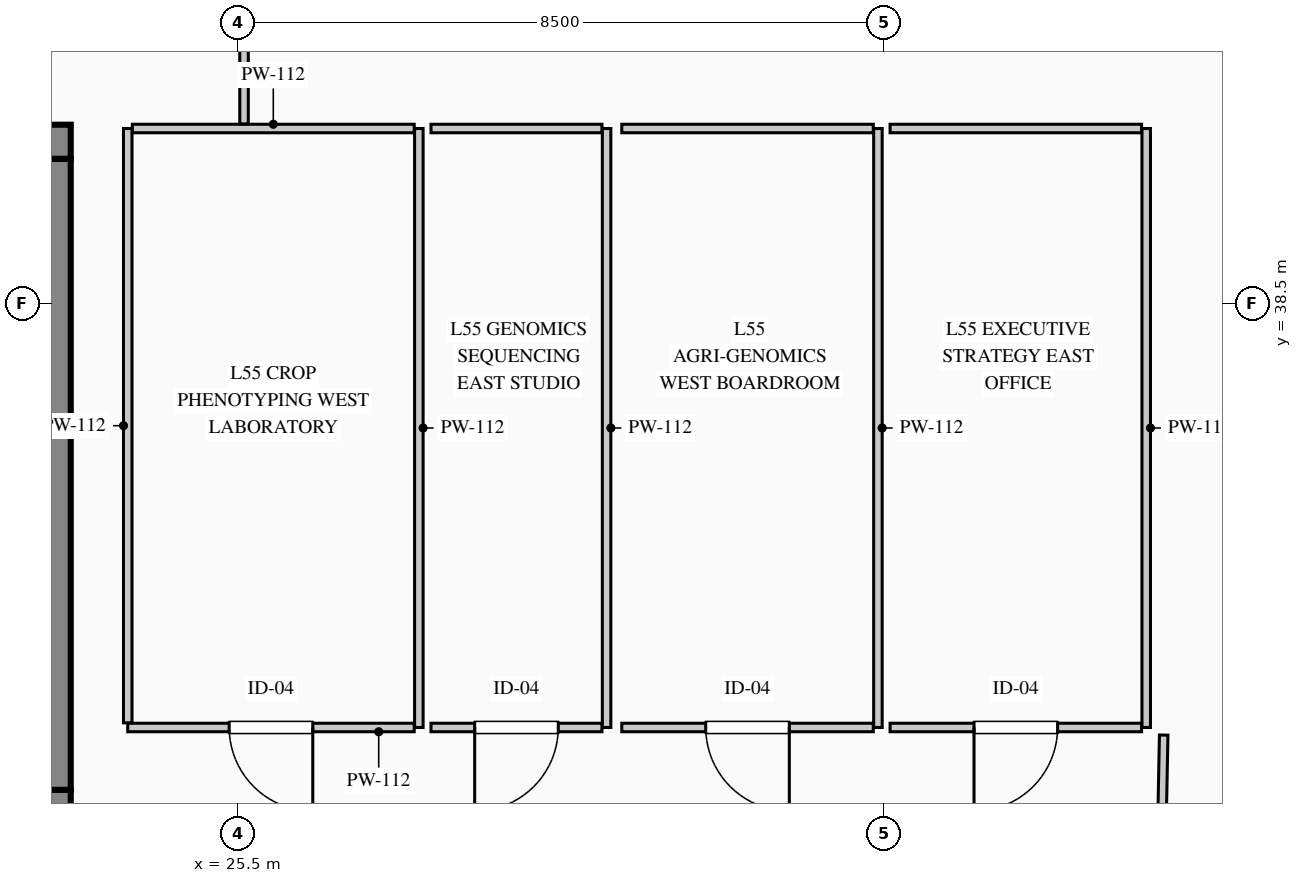
"""IFC4 building model, lengths in metres.
Left out: names, types, materials, properties, quantities, classifications, styles, units other than length and angle.
Written with IfcOpenShell. Run it as: python <this file> out.ifc"""

import sys

from ifc_helpers import new_model, si_unit, direction, frame, frame_2d, origin, place, context, subcontext, project, spatial, rectangle, extrude, element, fill, save


model = new_model("IFC4")
c1 = context("Model", 3, precision=1e-05, world=origin(), true_north=direction((0.0, 1.0)))
c2 = subcontext(c1, "Body", "Model", "MODEL_VIEW")
j1 = project(units=[si_unit("LENGTHUNIT", "METRE"), si_unit("PLANEANGLEUNIT", "RADIAN")], contexts=[c1])
p1 = place(None, origin())
s1 = spatial("IfcSite", under=j1, at=p1, CompositionType="ELEMENT")
p2 = place(p1, origin())
s2 = spatial("IfcBuilding", under=s1, at=p2, CompositionType="ELEMENT")
p3 = place(p2, frame((0.0, 0.0, 231.15)))
s3 = spatial("IfcBuildingStorey", under=s2, at=p3, CompositionType="ELEMENT", Elevation=231.15)
p4 = place(p3, frame((5.55, 40.625, 0.0), z_axis=(0.0, 0.0, 1.0), x_axis=(1.0, 0.0, 0.0)))
e1 = element("IfcWall", 1, at=p4, inside=s3, PredefinedType="SHEAR", context=c2, shape_type="SweptSolid", body=[
    extrude(rectangle(XDim=17.75, YDim=0.45, at=frame_2d((8.875, 0.0))), origin(), (0.0, 0.0, 1.0), 3.95),
])
p5 = place(p4, frame((15.895, 0.0, 0.0)))
e2 = element("IfcOpeningElement", 2, at=p5, cuts=e1, PredefinedType="OPENING", context=c2, shape_type="SweptSolid", body=[
    extrude(rectangle(XDim=1.18, YDim=2.25, at=frame_2d((0.59, 1.125))), frame((0.0, 0.235, 0.0), z_axis=(0.0, -1.0, 0.0), x_axis=(1.0, 0.0, 0.0)), (0.0, 0.0, 1.0), 0.47),
])
p6 = place(p3, frame((5.55, 31.875, 0.0), z_axis=(0.0, 0.0, 1.0), x_axis=(1.0, 0.0, 0.0)))
e3 = element("IfcWall", 3, at=p6, inside=s3, PredefinedType="SHEAR", context=c2, shape_type="SweptSolid", body=[
    extrude(rectangle(XDim=17.75, YDim=0.45, at=frame_2d((8.875, 0.0))), origin(), (0.0, 0.0, 1.0), 3.95),
])
p7 = place(p6, frame((3.1, 0.0, 0.0)))
e4 = element("IfcOpeningElement", 4, at=p7, cuts=e3, PredefinedType="OPENING", context=c2, shape_type="SweptSolid", body=[
    extrude(rectangle(XDim=1.2, YDim=2.2, at=frame_2d((0.6, 1.1))), frame((0.0, 0.235, 0.0), z_axis=(0.0, -1.0, 0.0), x_axis=(1.0, 0.0, 0.0)), (0.0, 0.0, 1.0), 0.47),
])
p8 = place(p6, frame((6.95, 0.0, 0.0)))
e5 = element("IfcOpeningElement", 5, at=p8, cuts=e3, PredefinedType="OPENING", context=c2, shape_type="SweptSolid", body=[
    extrude(rectangle(XDim=1.2, YDim=2.2, at=frame_2d((0.6, 1.1))), frame((0.0, 0.235, 0.0), z_axis=(0.0, -1.0, 0.0), x_axis=(1.0, 0.0, 0.0)), (0.0, 0.0, 1.0), 0.47),
])
p9 = place(p6, frame((8.8, 0.0, 0.0)))
e6 = element("IfcOpeningElement", 6, at=p9, cuts=e3, PredefinedType="OPENING", context=c2, shape_type="SweptSolid", body=[
    extrude(rectangle(XDim=1.15, YDim=2.2, at=frame_2d((0.575, 1.1))), frame((0.0, 0.235, 0.0), z_axis=(0.0, -1.0, 0.0), x_axis=(1.0, 0.0, 0.0)), (0.0, 0.0, 1.0), 0.47),
])
p10 = place(p6, frame((15.9, 0.0, 0.0)))
e7 = element("IfcOpeningElement", 7, at=p10, cuts=e3, PredefinedType="OPENING", context=c2, shape_type="SweptSolid", body=[
    extrude(rectangle(XDim=1.2, YDim=2.2, at=frame_2d((0.6, 1.1))), frame((0.0, 0.235, 0.0), z_axis=(0.0, -1.0, 0.0), x_axis=(1.0, 0.0, 0.0)), (0.0, 0.0, 1.0), 0.47),
])
p11 = place(p3, frame((23.075, 32.1, 0.0), z_axis=(0.0, 0.0, 1.0), x_axis=(0.0, 1.0, 0.0)))
e8 = element("IfcWall", 8, at=p11, inside=s3, PredefinedType="SHEAR", context=c2, shape_type="SweptSolid", body=[
    extrude(rectangle(XDim=8.3, YDim=0.45, at=frame_2d((4.15, 0.0))), origin(), (0.0, 0.0, 1.0), 3.95),
])
p12 = place(p3, frame((27.88, 40.8, 0.0), z_axis=(0.0, 0.0, 1.0), x_axis=(0.0, -1.0, 0.0)))
e9 = element("IfcWall", 9, at=p12, inside=s3, PredefinedType="PARTITIONING", context=c2, shape_type="SweptSolid", body=[
    extrude(rectangle(XDim=7.88, YDim=0.112, at=frame_2d((3.94, 0.0))), origin(), (0.0, 0.0, 1.0), 3.7),
])
p13 = place(p3, frame((27.819, 32.92, 0.0), z_axis=(0.0, 0.0, 1.0), x_axis=(-1.0, 0.0, 0.0)))
e10 = element("IfcWall", 10, at=p13, inside=s3, PredefinedType="PARTITIONING", context=c2, shape_type="SweptSolid", body=[
    extrude(rectangle(XDim=3.769, YDim=0.112, at=frame_2d((1.885, 0.0))), origin(), (0.0, 0.0, 1.0), 3.7),
])
p14 = place(p13, frame((1.334, 0.0, 0.0)))
e11 = element("IfcOpeningElement", 11, at=p14, cuts=e10, PredefinedType="OPENING", context=c2, shape_type="SweptSolid", body=[
    extrude(rectangle(XDim=1.1, YDim=2.2, at=frame_2d((0.55, 1.1))), frame((0.0, 0.066, 0.0), z_axis=(0.0, -1.0, 0.0), x_axis=(1.0, 0.0, 0.0)), (0.0, 0.0, 1.0), 0.132),
])
p15 = place(p3, frame((24.05, 32.981, 0.0), z_axis=(0.0, 0.0, 1.0), x_axis=(0.0, 1.0, 0.0)))
e12 = element("IfcWall", 12, at=p15, inside=s3, PredefinedType="PARTITIONING", context=c2, shape_type="SweptSolid", body=[
    extrude(rectangle(XDim=7.819, YDim=0.112, at=frame_2d((3.91, 0.0))), origin(), (0.0, 0.0, 1.0), 3.7),
])
p16 = place(p3, frame((24.111, 40.8, 0.0), z_axis=(0.0, 0.0, 1.0), x_axis=(1.0, 0.0, 0.0)))
e13 = element("IfcWall", 13, at=p16, inside=s3, PredefinedType="PARTITIONING", context=c2, shape_type="SweptSolid", body=[
    extrude(rectangle(XDim=3.708, YDim=0.112, at=frame_2d((1.854, 0.0))), origin(), (0.0, 0.0, 1.0), 3.7),
])
p17 = place(p3, frame((30.35, 40.8, 0.0), z_axis=(0.0, 0.0, 1.0), x_axis=(0.0, -1.0, 0.0)))
e14 = element("IfcWall", 14, at=p17, inside=s3, PredefinedType="PARTITIONING", context=c2, shape_type="SweptSolid", body=[
    extrude(rectangle(XDim=7.88, YDim=0.112, at=frame_2d((3.94, 0.0))), origin(), (0.0, 0.0, 1.0), 3.7),
])
p18 = place(p3, frame((30.289, 32.92, 0.0), z_axis=(0.0, 0.0, 1.0), x_axis=(-1.0, 0.0, 0.0)))
e15 = element("IfcWall", 15, at=p18, inside=s3, PredefinedType="PARTITIONING", context=c2, shape_type="SweptSolid", body=[
    extrude(rectangle(XDim=2.249, YDim=0.112, at=frame_2d((1.125, 0.0))), origin(), (0.0, 0.0, 1.0), 3.7),
])
p19 = place(p18, frame((0.574, 0.0, 0.0)))
e16 = element("IfcOpeningElement", 16, at=p19, cuts=e15, PredefinedType="OPENING", context=c2, shape_type="SweptSolid", body=[
    extrude(rectangle(XDim=1.1, YDim=2.2, at=frame_2d((0.55, 1.1))), frame((0.0, 0.066, 0.0), z_axis=(0.0, -1.0, 0.0), x_axis=(1.0, 0.0, 0.0)), (0.0, 0.0, 1.0), 0.132),
])
p20 = place(p3, frame((28.04, 40.8, 0.0), z_axis=(0.0, 0.0, 1.0), x_axis=(1.0, 0.0, 0.0)))
e17 = element("IfcWall", 17, at=p20, inside=s3, PredefinedType="PARTITIONING", context=c2, shape_type="SweptSolid", body=[
    extrude(rectangle(XDim=2.249, YDim=0.112, at=frame_2d((1.125, 0.0))), origin(), (0.0, 0.0, 1.0), 3.7),
])
p21 = place(p3, frame((33.92, 40.8, 0.0), z_axis=(0.0, 0.0, 1.0), x_axis=(0.0, -1.0, 0.0)))
e18 = element("IfcWall", 18, at=p21, inside=s3, PredefinedType="PARTITIONING", context=c2, shape_type="SweptSolid", body=[
    extrude(rectangle(XDim=7.88, YDim=0.112, at=frame_2d((3.94, 0.0))), origin(), (0.0, 0.0, 1.0), 3.7),
])
p22 = place(p3, frame((33.859, 32.92, 0.0), z_axis=(0.0, 0.0, 1.0), x_axis=(-1.0, 0.0, 0.0)))
e19 = element("IfcWall", 19, at=p22, inside=s3, PredefinedType="PARTITIONING", context=c2, shape_type="SweptSolid", body=[
    extrude(rectangle(XDim=3.309, YDim=0.112, at=frame_2d((1.654, 0.0))), origin(), (0.0, 0.0, 1.0), 3.7),
])
p23 = place(p22, frame((1.104, 0.0, 0.0)))
e20 = element("IfcOpeningElement", 20, at=p23, cuts=e19, PredefinedType="OPENING", context=c2, shape_type="SweptSolid", body=[
    extrude(rectangle(XDim=1.1, YDim=2.2, at=frame_2d((0.55, 1.1))), frame((0.0, 0.066, 0.0), z_axis=(0.0, -1.0, 0.0), x_axis=(1.0, 0.0, 0.0)), (0.0, 0.0, 1.0), 0.132),
])
p24 = place(p3, frame((30.55, 40.8, 0.0), z_axis=(0.0, 0.0, 1.0), x_axis=(1.0, 0.0, 0.0)))
e21 = element("IfcWall", 21, at=p24, inside=s3, PredefinedType="PARTITIONING", context=c2, shape_type="SweptSolid", body=[
    extrude(rectangle(XDim=3.309, YDim=0.112, at=frame_2d((1.654, 0.0))), origin(), (0.0, 0.0, 1.0), 3.7),
])
p25 = place(p3, frame((37.45, 40.8, 0.0), z_axis=(0.0, 0.0, 1.0), x_axis=(0.0, -1.0, 0.0)))
e22 = element("IfcWall", 22, at=p25, inside=s3, PredefinedType="PARTITIONING", context=c2, shape_type="SweptSolid", body=[
    extrude(rectangle(XDim=7.88, YDim=0.112, at=frame_2d((3.94, 0.0))), origin(), (0.0, 0.0, 1.0), 3.7),
])
p26 = place(p3, frame((37.389, 32.92, 0.0), z_axis=(0.0, 0.0, 1.0), x_axis=(-1.0, 0.0, 0.0)))
e23 = element("IfcWall", 23, at=p26, inside=s3, PredefinedType="PARTITIONING", context=c2, shape_type="SweptSolid", body=[
    extrude(rectangle(XDim=3.309, YDim=0.112, at=frame_2d((1.654, 0.0))), origin(), (0.0, 0.0, 1.0), 3.7),
])
p27 = place(p26, frame((1.104, 0.0, 0.0)))
e24 = element("IfcOpeningElement", 24, at=p27, cuts=e23, PredefinedType="OPENING", context=c2, shape_type="SweptSolid", body=[
    extrude(rectangle(XDim=1.1, YDim=2.2, at=frame_2d((0.55, 1.1))), frame((0.0, 0.066, 0.0), z_axis=(0.0, -1.0, 0.0), x_axis=(1.0, 0.0, 0.0)), (0.0, 0.0, 1.0), 0.132),
])
p28 = place(p3, frame((34.08, 40.8, 0.0), z_axis=(0.0, 0.0, 1.0), x_axis=(1.0, 0.0, 0.0)))
e25 = element("IfcWall", 25, at=p28, inside=s3, PredefinedType="PARTITIONING", context=c2, shape_type="SweptSolid", body=[
    extrude(rectangle(XDim=3.309, YDim=0.112, at=frame_2d((1.654, 0.0))), origin(), (0.0, 0.0, 1.0), 3.7),
])
p29 = place(p3, frame((37.599, 28.691, 0.0), z_axis=(0.0, 0.0, 1.0), x_axis=(0.019566997539, 0.999808547977, 0.0)))
e26 = element("IfcWall", 26, at=p29, inside=s3, PredefinedType="PARTITIONING", context=c2, shape_type="SweptSolid", body=[
    extrude(rectangle(XDim=4.13, YDim=0.112, at=frame_2d((2.065, 0.0))), origin(), (0.0, 0.0, 1.0), 3.7),
])
p30 = place(p29, frame((1.515, 0.0, 0.0)))
e27 = element("IfcOpeningElement", 27, at=p30, cuts=e26, PredefinedType="OPENING", context=c2, shape_type="SweptSolid", body=[
    extrude(rectangle(XDim=1.1, YDim=2.2, at=frame_2d((0.55, 1.1))), frame((0.0, 0.066, 0.0), z_axis=(0.0, -1.0, 0.0), x_axis=(1.0, 0.0, 0.0)), (0.0, 0.0, 1.0), 0.132),
])
p31 = place(p3, frame((25.58, 40.861, 0.0), z_axis=(0.0, 0.0, 1.0), x_axis=(0.0, 1.0, 0.0)))
e28 = element("IfcWall", 28, at=p31, inside=s3, PredefinedType="PARTITIONING", context=c2, shape_type="SweptSolid", body=[
    extrude(rectangle(XDim=2.394, YDim=0.112, at=frame_2d((1.197, 0.0))), origin(), (0.0, 0.0, 1.0), 3.7),
])
p32 = place(p14, origin())
e29 = element("IfcDoor", 29, at=p32, inside=s3, OperationType="SINGLE_SWING_LEFT", PredefinedType="DOOR", context=c2, shape_type="SweptSolid", body=[
    extrude(rectangle(XDim=1.1, YDim=2.2, at=frame_2d((0.55, 1.1))), frame((0.0, 0.025, 0.0), z_axis=(0.0, -1.0, 0.0), x_axis=(1.0, 0.0, 0.0)), (0.0, 0.0, 1.0), 0.05),
])
fill(e11, e29)
p33 = place(p19, origin())
e30 = element("IfcDoor", 30, at=p33, inside=s3, OperationType="SINGLE_SWING_RIGHT", PredefinedType="DOOR", context=c2, shape_type="SweptSolid", body=[
    extrude(rectangle(XDim=1.1, YDim=2.2, at=frame_2d((0.55, 1.1))), frame((0.0, 0.025, 0.0), z_axis=(0.0, -1.0, 0.0), x_axis=(1.0, 0.0, 0.0)), (0.0, 0.0, 1.0), 0.05),
])
fill(e16, e30)
p34 = place(p23, origin())
e31 = element("IfcDoor", 31, at=p34, inside=s3, OperationType="SINGLE_SWING_LEFT", PredefinedType="DOOR", context=c2, shape_type="SweptSolid", body=[
    extrude(rectangle(XDim=1.1, YDim=2.2, at=frame_2d((0.55, 1.1))), frame((0.0, 0.025, 0.0), z_axis=(0.0, -1.0, 0.0), x_axis=(1.0, 0.0, 0.0)), (0.0, 0.0, 1.0), 0.05),
])
fill(e20, e31)
p35 = place(p27, origin())
e32 = element("IfcDoor", 32, at=p35, inside=s3, OperationType="SINGLE_SWING_RIGHT", PredefinedType="DOOR", context=c2, shape_type="SweptSolid", body=[
    extrude(rectangle(XDim=1.1, YDim=2.2, at=frame_2d((0.55, 1.1))), frame((0.0, 0.025, 0.0), z_axis=(0.0, -1.0, 0.0), x_axis=(1.0, 0.0, 0.0)), (0.0, 0.0, 1.0), 0.05),
])
fill(e24, e32)
save(model, sys.argv[1])
